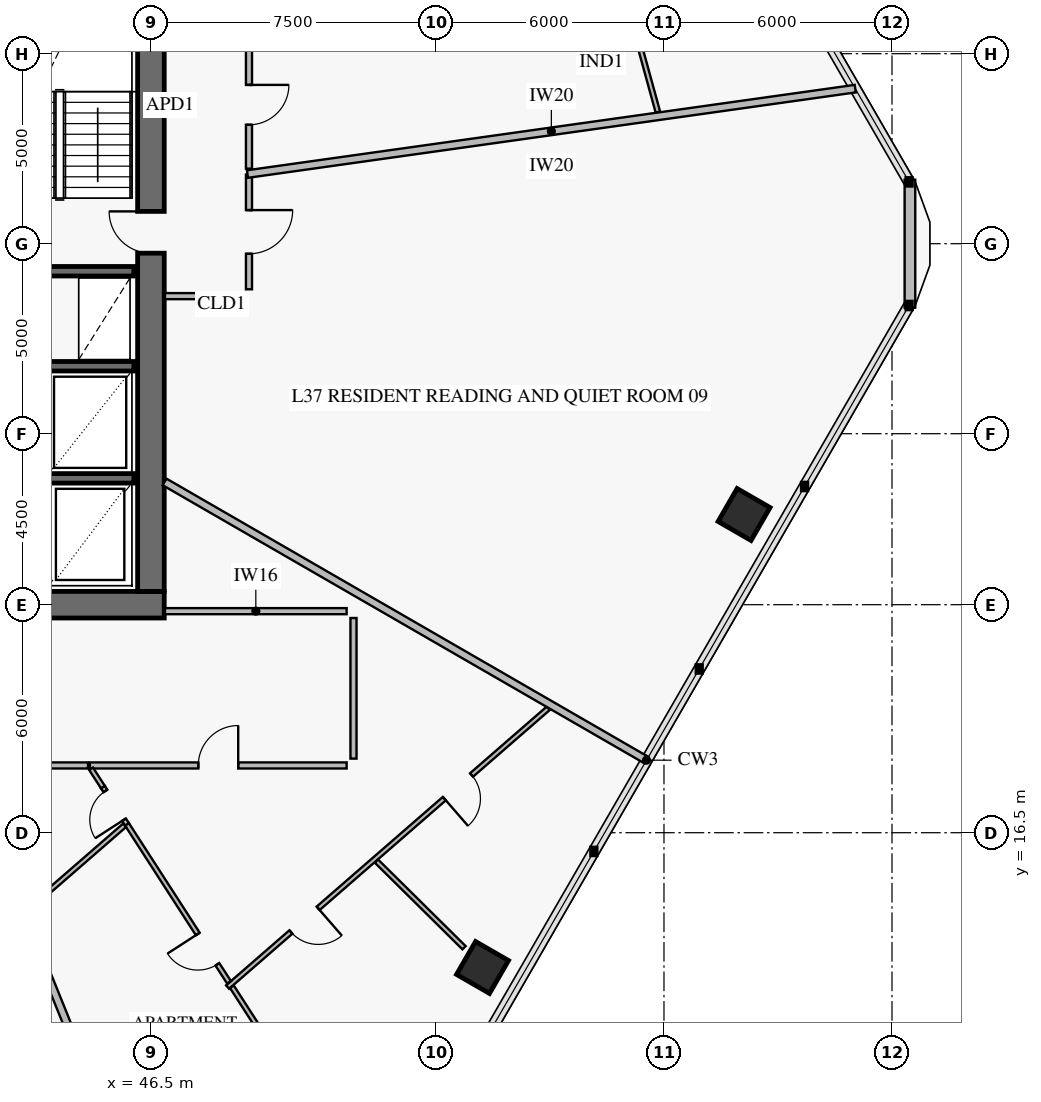
"""IFC4 building model, lengths in metres.
Left out: names, types, materials, properties, quantities, classifications, styles, units other than length and angle.
Written with IfcOpenShell. Run it as: python <this file> out.ifc"""

import sys

from ifc_helpers import new_model, si_unit, direction, frame, frame_2d, origin, origin_2d, place, context, subcontext, project, spatial, rectangle, extrude, element, fill, save


model = new_model("IFC4")
c1 = context("Model", 3, precision=1e-05, world=origin(), true_north=direction((0.0, 1.0)))
c2 = subcontext(c1, "Body", "Model", "MODEL_VIEW")
j1 = project(units=[si_unit("LENGTHUNIT", "METRE"), si_unit("PLANEANGLEUNIT", "RADIAN")], contexts=[c1])
p1 = place(None, origin())
s1 = spatial("IfcSite", under=j1, at=p1, CompositionType="ELEMENT")
p2 = place(p1, origin())
s2 = spatial("IfcBuilding", under=s1, at=p2, CompositionType="ELEMENT")
p3 = place(p2, frame((0.0, 0.0, 150.4)))
s3 = spatial("IfcBuildingStorey", under=s2, at=p3, CompositionType="ELEMENT", Elevation=150.4)
p4 = place(p3, frame((37.35, 22.5, 0.0), z_axis=(0.0, 0.0, 1.0), x_axis=(1.0, 0.0, 0.0)))
e1 = element("IfcWall", 1, at=p4, inside=s3, PredefinedType="SHEAR", context=c2, shape_type="SweptSolid", body=[
    extrude(rectangle(XDim=9.5, YDim=0.7, at=frame_2d((4.75, 0.0))), origin(), (0.0, 0.0, 1.0), 3.8),
])
p5 = place(p4, frame((3.95, 0.0, 0.0)))
e2 = element("IfcOpeningElement", 2, at=p5, cuts=e1, PredefinedType="OPENING", context=c2, shape_type="SweptSolid", body=[
    extrude(rectangle(XDim=1.5, YDim=2.15, at=frame_2d((0.75, 1.075))), frame((0.0, 0.362, 0.0), z_axis=(0.0, -1.0, 0.0), x_axis=(1.0, 0.0, 0.0)), (0.0, 0.0, 1.0), 0.724),
])
p6 = place(p3, frame((46.5, 22.85, 0.0), z_axis=(0.0, 0.0, 1.0), x_axis=(0.0, 1.0, 0.0)))
e3 = element("IfcWall", 3, at=p6, inside=s3, PredefinedType="SHEAR", context=c2, shape_type="SweptSolid", body=[
    extrude(rectangle(XDim=18.3, YDim=0.7, at=frame_2d((9.15, 0.0))), origin(), (0.0, 0.0, 1.0), 3.8),
])
p7 = place(p6, frame((8.9, 0.0, 0.0)))
e4 = element("IfcOpeningElement", 4, at=p7, cuts=e3, PredefinedType="OPENING", context=c2, shape_type="SweptSolid", body=[
    extrude(rectangle(XDim=1.1, YDim=2.15, at=frame_2d((0.55, 1.075))), frame((0.0, 0.362, 0.0), z_axis=(0.0, -1.0, 0.0), x_axis=(1.0, 0.0, 0.0)), (0.0, 0.0, 1.0), 0.724),
])
for number, where, z_axis, x_axis in (
    (5, (55.226, 12.953, 0.0), (0.0, 0.0, 1.0), (0.5, 0.866, 0.0)),
    (6, (62.108, 24.874, 0.0), (0.0, 0.0, 1.0), (0.5, 0.866, 0.0)),
):
    element("IfcColumn", number, at=place(p3, frame(where, z_axis=z_axis, x_axis=x_axis)), inside=s3, PredefinedType="COLUMN", context=c2, shape_type="SweptSolid", body=[
        extrude(rectangle(XDim=1.0, YDim=1.0, at=origin_2d()), origin(), (0.0, 0.0, 1.0), 3.55),
    ])
p8 = place(p3, frame((66.472, 33.683, 0.0), z_axis=(0.0, 0.0, 1.0), x_axis=(0.0, -1.0, 0.0)))
e7 = element("IfcWall", 7, at=p8, inside=s3, PredefinedType="SOLIDWALL", context=c2, shape_type="SweptSolid", body=[
    extrude(rectangle(XDim=3.365, YDim=0.28, at=frame_2d((1.683, 0.0))), origin(), (0.0, 0.0, 1.0), 3.55),
])
p9 = place(p3, frame((25.95, 31.275, 0.0), z_axis=(0.0, 0.0, 1.0), x_axis=(1.0, 0.0, 0.0)))
e8 = element("IfcWall", 8, at=p9, inside=s3, PredefinedType="SOLIDWALL", context=c2, shape_type="SweptSolid", body=[
    extrude(rectangle(XDim=20.1, YDim=0.25, at=frame_2d((10.05, 0.0))), origin(), (0.0, 0.0, 1.0), 3.8),
])
p10 = place(p9, frame((2.6, 0.0, 0.0)))
e9 = element("IfcOpeningElement", 9, at=p10, cuts=e8, PredefinedType="OPENING", context=c2, shape_type="SweptSolid", body=[
    extrude(rectangle(XDim=1.1, YDim=2.15, at=frame_2d((0.55, 1.075))), frame((0.0, 0.137, 0.0), z_axis=(0.0, -1.0, 0.0), x_axis=(1.0, 0.0, 0.0)), (0.0, 0.0, 1.0), 0.274),
])
p11 = place(p9, frame((10.6, 0.0, 0.0)))
e10 = element("IfcOpeningElement", 10, at=p11, cuts=e8, PredefinedType="OPENING", context=c2, shape_type="SweptSolid", body=[
    extrude(rectangle(XDim=1.1, YDim=2.15, at=frame_2d((0.55, 1.075))), frame((0.0, 0.137, 0.0), z_axis=(0.0, -1.0, 0.0), x_axis=(1.0, 0.0, 0.0)), (0.0, 0.0, 1.0), 0.274),
])
p12 = place(p9, frame((16.35, 0.0, 0.0)))
e11 = element("IfcOpeningElement", 11, at=p12, cuts=e8, PredefinedType="OPENING", context=c2, shape_type="SweptSolid", body=[
    extrude(rectangle(XDim=1.1, YDim=2.15, at=frame_2d((0.55, 1.075))), frame((0.0, 0.137, 0.0), z_axis=(0.0, -1.0, 0.0), x_axis=(1.0, 0.0, 0.0)), (0.0, 0.0, 1.0), 0.274),
])
for number, where, z_axis, x_axis in (
    (12, (43.8, 25.825, 0.0), (0.0, 0.0, 1.0), (1.0, 0.0, 0.0)),
    (13, (43.8, 28.775, 0.0), (0.0, 0.0, 1.0), (1.0, 0.0, 0.0)),
):
    element("IfcWall", number, at=place(p3, frame(where, z_axis=z_axis, x_axis=x_axis)), inside=s3, PredefinedType="SOLIDWALL", context=c2, shape_type="SweptSolid", body=[
        extrude(rectangle(XDim=2.25, YDim=0.25, at=frame_2d((1.125, 0.0))), origin(), (0.0, 0.0, 1.0), 3.8),
    ])
p13 = place(p3, frame((59.84, 35.462, 0.0), z_axis=(0.0, 0.0, 1.0), x_axis=(-0.265206859365, 0.964191537894, 0.0)))
e14 = element("IfcWall", 14, at=p13, inside=s3, PredefinedType="PARTITIONING", context=c2, shape_type="SweptSolid", body=[
    extrude(rectangle(XDim=5.97, YDim=0.12, at=frame_2d((2.985, 0.0))), origin(), (0.0, 0.0, 1.0), 2.9),
])
p14 = place(p13, frame((2.51, 0.0, 0.0)))
e15 = element("IfcOpeningElement", 15, at=p14, cuts=e14, PredefinedType="OPENING", context=c2, shape_type="SweptSolid", body=[
    extrude(rectangle(XDim=0.95, YDim=2.1, at=frame_2d((0.475, 1.05))), frame((0.0, 0.072, 0.0), z_axis=(0.0, -1.0, 0.0), x_axis=(1.0, 0.0, 0.0)), (0.0, 0.0, 1.0), 0.144),
])
p15 = place(p3, frame((49.08, 33.975, 0.0), z_axis=(0.0, 0.0, 1.0), x_axis=(0.0, 1.0, 0.0)))
e16 = element("IfcWall", 16, at=p15, inside=s3, PredefinedType="PARTITIONING", context=c2, shape_type="SweptSolid", body=[
    extrude(rectangle(XDim=3.357, YDim=0.16, at=frame_2d((1.679, 0.0))), origin(), (0.0, 0.0, 1.0), 2.9),
])
p16 = place(p15, frame((1.154, 0.0, 0.0)))
e17 = element("IfcOpeningElement", 17, at=p16, cuts=e16, PredefinedType="OPENING", context=c2, shape_type="SweptSolid", body=[
    extrude(rectangle(XDim=1.05, YDim=2.15, at=frame_2d((0.525, 1.075))), frame((0.0, 0.092, 0.0), z_axis=(0.0, -1.0, 0.0), x_axis=(1.0, 0.0, 0.0)), (0.0, 0.0, 1.0), 0.184),
])
p17 = place(p3, frame((48.517, 12.438, 0.0), z_axis=(0.0, 0.0, 1.0), x_axis=(0.754704710889, 0.656064630476, 0.0)))
e18 = element("IfcWall", 18, at=p17, inside=s3, PredefinedType="PARTITIONING", context=c2, shape_type="SweptSolid", body=[
    extrude(rectangle(XDim=11.18, YDim=0.12, at=frame_2d((5.59, 0.0))), origin(), (0.0, 0.0, 1.0), 2.9),
])
p18 = place(p17, frame((2.208, 0.0, 0.0)))
e19 = element("IfcOpeningElement", 19, at=p18, cuts=e18, PredefinedType="OPENING", context=c2, shape_type="SweptSolid", body=[
    extrude(rectangle(XDim=0.95, YDim=2.1, at=frame_2d((0.475, 1.05))), frame((0.0, 0.072, 0.0), z_axis=(0.0, -1.0, 0.0), x_axis=(1.0, 0.0, 0.0)), (0.0, 0.0, 1.0), 0.144),
])
p19 = place(p17, frame((7.558, 0.0, 0.0)))
e20 = element("IfcOpeningElement", 20, at=p19, cuts=e18, PredefinedType="OPENING", context=c2, shape_type="SweptSolid", body=[
    extrude(rectangle(XDim=0.95, YDim=2.1, at=frame_2d((0.475, 1.05))), frame((0.0, 0.072, 0.0), z_axis=(0.0, -1.0, 0.0), x_axis=(1.0, 0.0, 0.0)), (0.0, 0.0, 1.0), 0.144),
])
p20 = place(p3, frame((45.237, 17.7, 0.0), z_axis=(0.0, 0.0, 1.0), x_axis=(0.542645136481, -0.839962056199, 0.0)))
e21 = element("IfcWall", 21, at=p20, inside=s3, PredefinedType="PARTITIONING", context=c2, shape_type="SweptSolid", body=[
    extrude(rectangle(XDim=1.169, YDim=0.12, at=frame_2d((0.585, 0.0))), origin(), (0.0, 0.0, 1.0), 3.55),
])
p21 = place(p20, frame((0.121, 0.0, 0.0)))
e22 = element("IfcOpeningElement", 22, at=p21, cuts=e21, PredefinedType="OPENING", context=c2, shape_type="SweptSolid", body=[
    extrude(rectangle(XDim=0.9, YDim=2.1, at=frame_2d((0.45, 1.05))), frame((0.0, 0.072, 0.0), z_axis=(0.0, -1.0, 0.0), x_axis=(1.0, 0.0, 0.0)), (0.0, 0.0, 1.0), 0.144),
])
p22 = place(p3, frame((45.871, 16.718, 0.0), z_axis=(0.0, 0.0, 1.0), x_axis=(0.54259218167, -0.83999626451, 0.0)))
e23 = element("IfcWall", 23, at=p22, inside=s3, PredefinedType="PARTITIONING", context=c2, shape_type="SweptSolid", body=[
    extrude(rectangle(XDim=4.947, YDim=0.12, at=frame_2d((2.473, 0.0))), origin(), (0.0, 0.0, 1.0), 3.55),
])
p23 = place(p22, frame((3.432, 0.0, 0.0)))
e24 = element("IfcOpeningElement", 24, at=p23, cuts=e23, PredefinedType="OPENING", context=c2, shape_type="SweptSolid", body=[
    extrude(rectangle(XDim=0.95, YDim=2.1, at=frame_2d((0.475, 1.05))), frame((0.0, 0.072, 0.0), z_axis=(0.0, -1.0, 0.0), x_axis=(1.0, 0.0, 0.0)), (0.0, 0.0, 1.0), 0.144),
])
p24 = place(p3, frame((48.63, 12.447, 0.0), z_axis=(0.0, 0.0, 1.0), x_axis=(0.5425590103, -0.840017690494, 0.0)))
e25 = element("IfcWall", 25, at=p24, inside=s3, PredefinedType="PARTITIONING", context=c2, shape_type="SweptSolid", body=[
    extrude(rectangle(XDim=2.779, YDim=0.12, at=frame_2d((1.39, 0.0))), origin(), (0.0, 0.0, 1.0), 3.55),
])
p25 = place(p3, frame((44.893, 18.27, 0.0), z_axis=(0.0, 0.0, 1.0), x_axis=(1.0, 0.0, 0.0)))
e26 = element("IfcWall", 26, at=p25, inside=s3, PredefinedType="PARTITIONING", context=c2, shape_type="SweptSolid", body=[
    extrude(rectangle(XDim=6.757, YDim=0.16, at=frame_2d((3.379, 0.0))), origin(), (0.0, 0.0, 1.0), 2.9),
])
p26 = place(p25, frame((2.854, 0.0, 0.0)))
e27 = element("IfcOpeningElement", 27, at=p26, cuts=e26, PredefinedType="OPENING", context=c2, shape_type="SweptSolid", body=[
    extrude(rectangle(XDim=1.05, YDim=2.15, at=frame_2d((0.525, 1.075))), frame((0.0, 0.092, 0.0), z_axis=(0.0, -1.0, 0.0), x_axis=(1.0, 0.0, 0.0)), (0.0, 0.0, 1.0), 0.184),
])
p27 = place(p3, frame((49.08, 30.8, 0.0), z_axis=(0.0, 0.0, 1.0), x_axis=(0.0, 1.0, 0.0)))
e28 = element("IfcWall", 28, at=p27, inside=s3, PredefinedType="PARTITIONING", context=c2, shape_type="SweptSolid", body=[
    extrude(rectangle(XDim=3.018, YDim=0.16, at=frame_2d((1.509, 0.0))), origin(), (0.0, 0.0, 1.0), 3.55),
])
p28 = place(p27, frame((0.934, 0.0, 0.0)))
e29 = element("IfcOpeningElement", 29, at=p28, cuts=e28, PredefinedType="OPENING", context=c2, shape_type="SweptSolid", body=[
    extrude(rectangle(XDim=1.15, YDim=2.2, at=frame_2d((0.575, 1.1))), frame((0.0, 0.092, 0.0), z_axis=(0.0, -1.0, 0.0), x_axis=(1.0, 0.0, 0.0)), (0.0, 0.0, 1.0), 0.184),
])
p29 = place(p3, frame((49.04, 33.833, 0.0), z_axis=(0.0, 0.0, 1.0), x_axis=(0.990268626923, 0.139169129232, 0.0)))
e30 = element("IfcWall", 30, at=p29, inside=s3, PredefinedType="PARTITIONING", context=c2, shape_type="SweptSolid", body=[
    extrude(rectangle(XDim=16.15, YDim=0.2, at=frame_2d((8.075, 0.0))), origin(), (0.0, 0.0, 1.0), 2.87),
])
p30 = place(p3, frame((41.531, 18.31, 0.0), z_axis=(0.0, 0.0, 1.0), x_axis=(0.374610610646, -0.92718223149, 0.0)))
e31 = element("IfcWall", 31, at=p30, inside=s3, PredefinedType="PARTITIONING", context=c2, shape_type="SweptSolid", body=[
    extrude(rectangle(XDim=14.553, YDim=0.2, at=frame_2d((7.276, 0.0))), origin(), (0.0, 0.0, 1.0), 2.87),
])
p31 = place(p3, frame((52.433, 15.753, 0.0), z_axis=(0.0, 0.0, 1.0), x_axis=(0.711123375878, -0.703067240227, 0.0)))
e32 = element("IfcWall", 32, at=p31, inside=s3, PredefinedType="PARTITIONING", context=c2, shape_type="SweptSolid", body=[
    extrude(rectangle(XDim=3.243, YDim=0.12, at=frame_2d((1.621, 0.0))), origin(), (0.0, 0.0, 1.0), 2.9),
])
p32 = place(p3, frame((44.926, 18.182, 0.0), z_axis=(0.0, 0.0, 1.0), x_axis=(0.542562967044, -0.840015134859, 0.0)))
e33 = element("IfcWall", 33, at=p32, inside=s3, PredefinedType="PARTITIONING", context=c2, shape_type="SweptSolid", body=[
    extrude(rectangle(XDim=0.574, YDim=0.12, at=frame_2d((0.287, 0.0))), origin(), (0.0, 0.0, 1.0), 3.55),
])
p33 = place(p3, frame((43.212, 14.439, 0.0), z_axis=(0.0, 0.0, 1.0), x_axis=(0.754711017703, 0.656057375355, 0.0)))
e34 = element("IfcWall", 34, at=p33, inside=s3, PredefinedType="PARTITIONING", context=c2, shape_type="SweptSolid", body=[
    extrude(rectangle(XDim=3.438, YDim=0.12, at=frame_2d((1.719, 0.0))), origin(), (0.0, 0.0, 1.0), 3.55),
])
p34 = place(p3, frame((46.858, 25.731, 0.0), z_axis=(0.0, 0.0, 1.0), x_axis=(0.866024853997, -0.500000952259, 0.0)))
e35 = element("IfcWall", 35, at=p34, inside=s3, PredefinedType="PARTITIONING", context=c2, shape_type="SweptSolid", body=[
    extrude(rectangle(XDim=14.646, YDim=0.2, at=frame_2d((7.323, 0.0))), origin(), (0.0, 0.0, 1.0), 2.87),
])
p35 = place(p3, frame((51.65, 22.33, 0.0), z_axis=(0.0, 0.0, 1.0), x_axis=(-1.0, 0.0, 0.0)))
e36 = element("IfcWall", 36, at=p35, inside=s3, PredefinedType="PARTITIONING", context=c2, shape_type="SweptSolid", body=[
    extrude(rectangle(XDim=4.78, YDim=0.16, at=frame_2d((2.39, 0.0))), origin(), (0.0, 0.0, 1.0), 3.55),
])
p36 = place(p3, frame((51.83, 18.45, 0.0), z_axis=(0.0, 0.0, 1.0), x_axis=(0.0, 1.0, 0.0)))
e37 = element("IfcWall", 37, at=p36, inside=s3, PredefinedType="PARTITIONING", context=c2, shape_type="SweptSolid", body=[
    extrude(rectangle(XDim=3.7, YDim=0.16, at=frame_2d((1.85, 0.0))), origin(), (0.0, 0.0, 1.0), 3.15),
])
p37 = place(p3, frame((41.709, 18.27, 0.0), z_axis=(0.0, 0.0, 1.0), x_axis=(1.0, 0.0, 0.0)))
e38 = element("IfcWall", 38, at=p37, inside=s3, PredefinedType="PARTITIONING", context=c2, shape_type="SweptSolid", body=[
    extrude(rectangle(XDim=3.136, YDim=0.16, at=frame_2d((1.568, 0.0))), origin(), (0.0, 0.0, 1.0), 3.55),
])
p38 = place(p3, frame((46.87, 30.62, 0.0), z_axis=(0.0, 0.0, 1.0), x_axis=(1.0, 0.0, 0.0)))
e39 = element("IfcWall", 39, at=p38, inside=s3, PredefinedType="PARTITIONING", context=c2, shape_type="SweptSolid", body=[
    extrude(rectangle(XDim=2.03, YDim=0.16, at=frame_2d((1.015, 0.0))), origin(), (0.0, 0.0, 1.0), 3.55),
])
p39 = place(p7, origin())
e40 = element("IfcDoor", 40, at=p39, inside=s3, OperationType="SINGLE_SWING_RIGHT", PredefinedType="USERDEFINED", context=c2, shape_type="SweptSolid", body=[
    extrude(rectangle(XDim=1.1, YDim=2.15, at=frame_2d((0.55, 1.075))), frame((0.0, 0.025, 0.0), z_axis=(0.0, -1.0, 0.0), x_axis=(1.0, 0.0, 0.0)), (0.0, 0.0, 1.0), 0.05),
])
fill(e4, e40)
p40 = place(p16, frame((1.05, 0.0, 0.0), z_axis=(0.0, 0.0, 1.0), x_axis=(-1.0, 0.0, 0.0)))
e41 = element("IfcDoor", 41, at=p40, inside=s3, OperationType="SINGLE_SWING_LEFT", PredefinedType="DOOR", context=c2, shape_type="SweptSolid", body=[
    extrude(rectangle(XDim=1.05, YDim=2.15, at=frame_2d((0.525, 1.075))), frame((0.0, 0.025, 0.0), z_axis=(0.0, -1.0, 0.0), x_axis=(1.0, 0.0, 0.0)), (0.0, 0.0, 1.0), 0.05),
])
fill(e17, e41)
p41 = place(p18, frame((0.95, 0.0, 0.0), z_axis=(0.0, 0.0, 1.0), x_axis=(-1.0, 0.0, 0.0)))
e42 = element("IfcDoor", 42, at=p41, inside=s3, OperationType="SINGLE_SWING_LEFT", PredefinedType="DOOR", context=c2, shape_type="SweptSolid", body=[
    extrude(rectangle(XDim=0.95, YDim=2.1, at=frame_2d((0.475, 1.05))), frame((0.0, 0.025, 0.0), z_axis=(0.0, -1.0, 0.0), x_axis=(1.0, 0.0, 0.0)), (0.0, 0.0, 1.0), 0.05),
])
fill(e19, e42)
p42 = place(p19, frame((0.95, 0.0, 0.0), z_axis=(0.0, 0.0, 1.0), x_axis=(-1.0, 0.0, 0.0)))
e43 = element("IfcDoor", 43, at=p42, inside=s3, OperationType="SINGLE_SWING_RIGHT", PredefinedType="DOOR", context=c2, shape_type="SweptSolid", body=[
    extrude(rectangle(XDim=0.95, YDim=2.1, at=frame_2d((0.475, 1.05))), frame((0.0, 0.025, 0.0), z_axis=(0.0, -1.0, 0.0), x_axis=(1.0, 0.0, 0.0)), (0.0, 0.0, 1.0), 0.05),
])
fill(e20, e43)
p43 = place(p21, frame((0.9, 0.0, 0.0), z_axis=(0.0, 0.0, 1.0), x_axis=(-1.0, 0.0, 0.0)))
e44 = element("IfcDoor", 44, at=p43, inside=s3, OperationType="SINGLE_SWING_LEFT", PredefinedType="DOOR", context=c2, shape_type="SweptSolid", body=[
    extrude(rectangle(XDim=0.9, YDim=2.1, at=frame_2d((0.45, 1.05))), frame((0.0, 0.025, 0.0), z_axis=(0.0, -1.0, 0.0), x_axis=(1.0, 0.0, 0.0)), (0.0, 0.0, 1.0), 0.05),
])
fill(e22, e44)
p44 = place(p23, frame((0.95, 0.0, 0.0), z_axis=(0.0, 0.0, 1.0), x_axis=(-1.0, 0.0, 0.0)))
e45 = element("IfcDoor", 45, at=p44, inside=s3, OperationType="SINGLE_SWING_RIGHT", PredefinedType="DOOR", context=c2, shape_type="SweptSolid", body=[
    extrude(rectangle(XDim=0.95, YDim=2.1, at=frame_2d((0.475, 1.05))), frame((0.0, 0.025, 0.0), z_axis=(0.0, -1.0, 0.0), x_axis=(1.0, 0.0, 0.0)), (0.0, 0.0, 1.0), 0.05),
])
fill(e24, e45)
p45 = place(p26, origin())
e46 = element("IfcDoor", 46, at=p45, inside=s3, OperationType="SINGLE_SWING_RIGHT", PredefinedType="DOOR", context=c2, shape_type="SweptSolid", body=[
    extrude(rectangle(XDim=1.05, YDim=2.15, at=frame_2d((0.525, 1.075))), frame((0.0, 0.025, 0.0), z_axis=(0.0, -1.0, 0.0), x_axis=(1.0, 0.0, 0.0)), (0.0, 0.0, 1.0), 0.05),
])
fill(e27, e46)
p46 = place(p28, frame((1.15, 0.0, 0.0), z_axis=(0.0, 0.0, 1.0), x_axis=(-1.0, 0.0, 0.0)))
e47 = element("IfcDoor", 47, at=p46, inside=s3, OperationType="SINGLE_SWING_LEFT", PredefinedType="DOOR", context=c2, shape_type="SweptSolid", body=[
    extrude(rectangle(XDim=1.15, YDim=2.2, at=frame_2d((0.575, 1.1))), frame((0.0, 0.025, 0.0), z_axis=(0.0, -1.0, 0.0), x_axis=(1.0, 0.0, 0.0)), (0.0, 0.0, 1.0), 0.05),
])
fill(e29, e47)
save(model, sys.argv[1])
